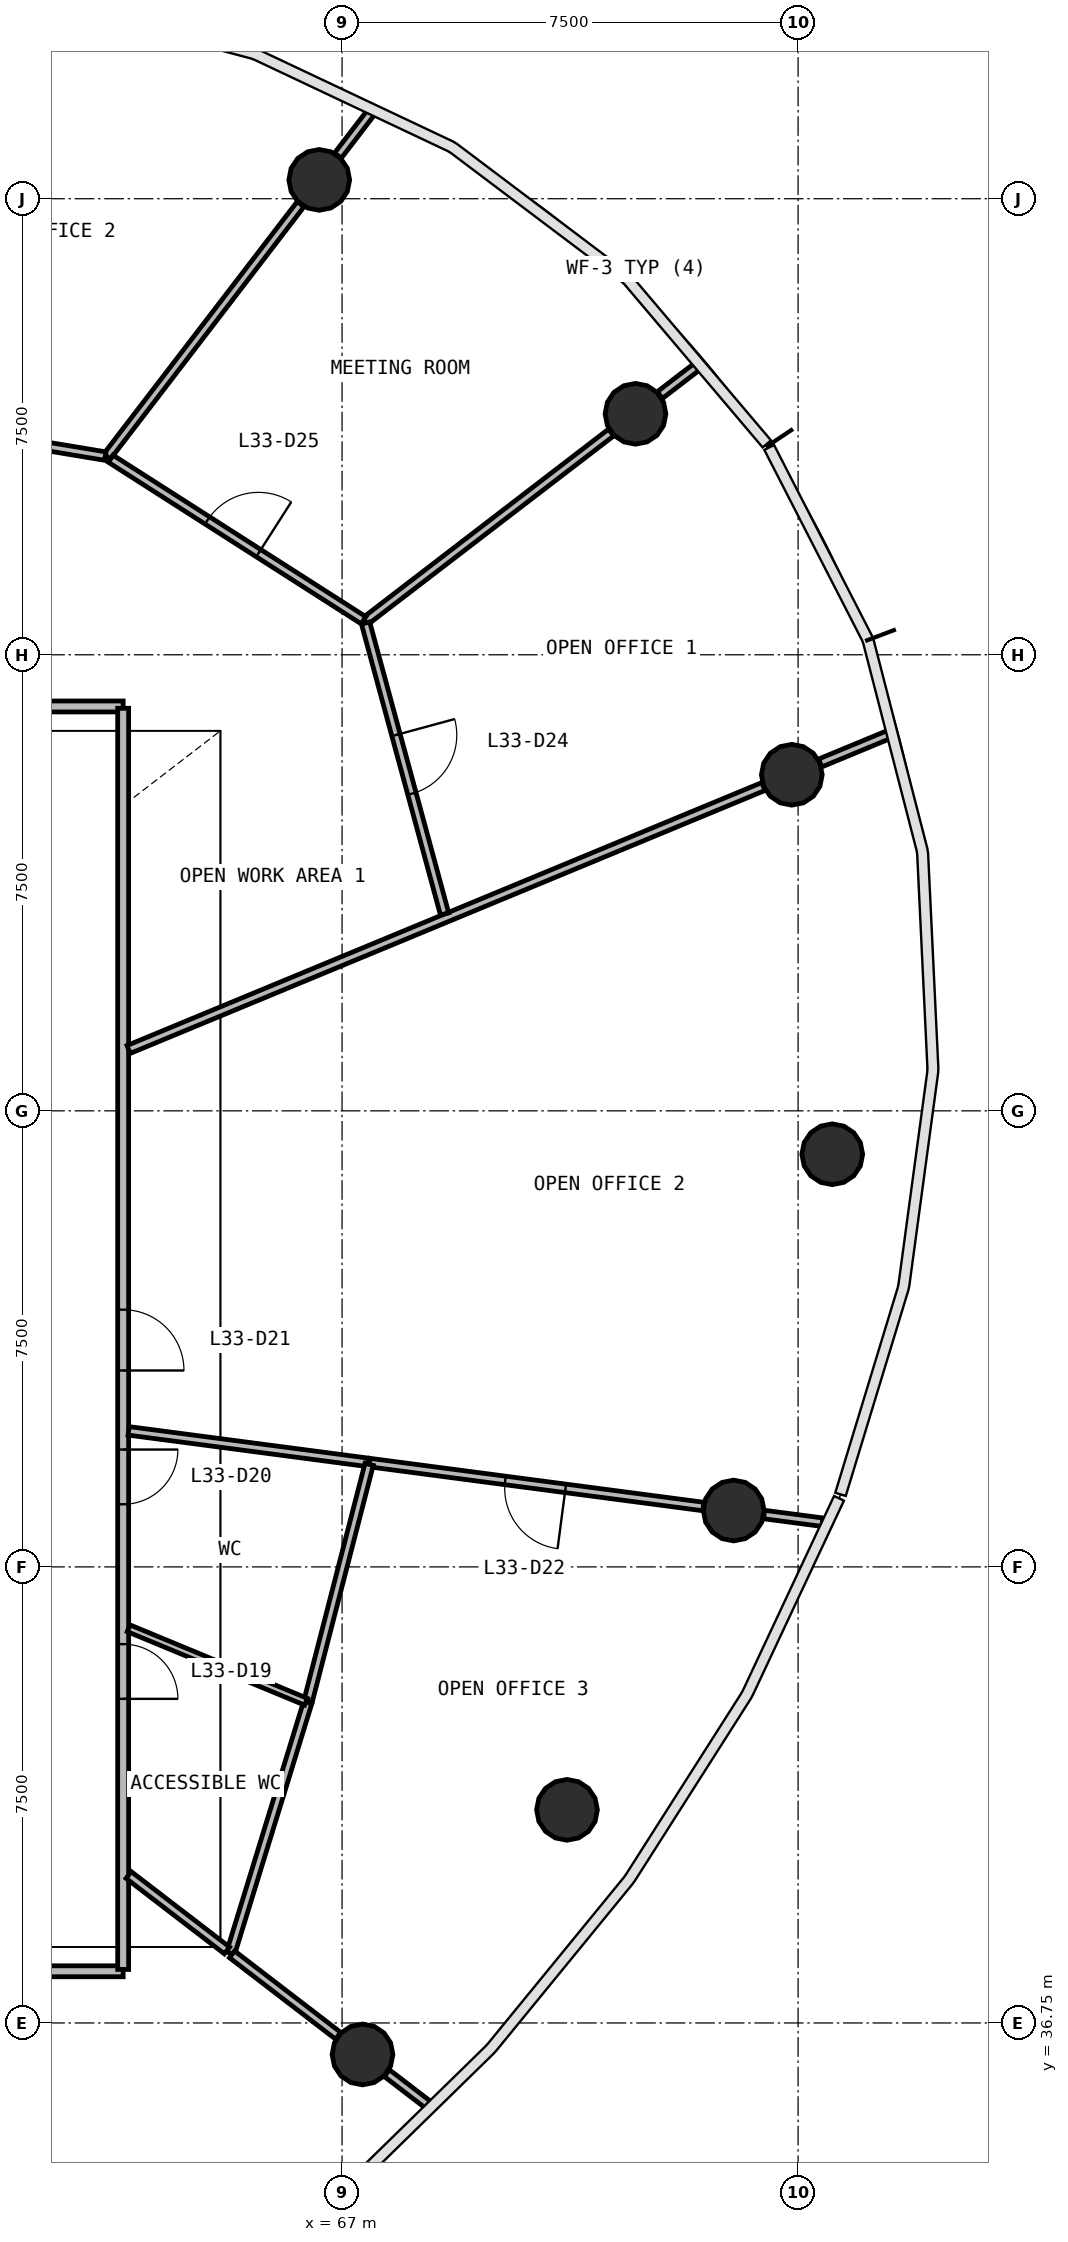
"""IFC4 building model, lengths in metres.
Left out: names, types, materials, properties, quantities, classifications, styles, units other than length and angle.
Written with IfcOpenShell. Run it as: python <this file> out.ifc"""

import sys

from ifc_helpers import new_model, si_unit, direction, frame, frame_2d, origin, origin_2d, place, context, subcontext, project, spatial, rectangle, circle, extrude, source, transform, mapped, element, fill, save


model = new_model("IFC4")
c1 = context("Model", 3, precision=1e-05, world=origin(), true_north=direction((0.0, 1.0)))
c2 = subcontext(c1, "Body", "Model", "MODEL_VIEW")
j1 = project(units=[si_unit("LENGTHUNIT", "METRE"), si_unit("PLANEANGLEUNIT", "RADIAN")], contexts=[c1])
p1 = place(None, origin())
s1 = spatial("IfcSite", under=j1, at=p1, CompositionType="ELEMENT")
p2 = place(p1, origin())
s2 = spatial("IfcBuilding", under=s1, at=p2, CompositionType="ELEMENT")
p3 = place(p2, frame((0.0, 0.0, 140.9)))
s3 = spatial("IfcBuildingStorey", under=s2, at=p3, CompositionType="ELEMENT", Elevation=140.9)
m1 = source(origin(), c2, "Body", "SweptSolid", [
    extrude(circle(Radius=0.5, at=origin_2d()), origin(), (0.0, 0.0, 1.0), 3.9),
])
for number, where, z_axis, x_axis in (
    (1, (75.062, 51.036, 0.0), (0.0, 0.0, 1.0), (1.0, 0.0, 0.0)),
    (2, (74.397, 57.277, 0.0), (0.0, 0.0, 1.0), (1.0, 0.0, 0.0)),
    (3, (71.826, 63.213, 0.0), (0.0, 0.0, 1.0), (1.0, 0.0, 0.0)),
    (4, (66.625, 67.06, 0.0), (0.0, 0.0, 1.0), (1.0, 0.0, 0.0)),
    (5, (67.336, 36.232, 0.0), (0.0, 0.0, 1.0), (1.0, 0.0, 0.0)),
    (6, (70.699, 40.254, 0.0), (0.0, 0.0, 1.0), (1.0, 0.0, 0.0)),
    (7, (73.441, 45.177, 0.0), (0.0, 0.0, 1.0), (1.0, 0.0, 0.0)),
):
    element("IfcColumn", number, at=place(p3, frame(where, z_axis=z_axis, x_axis=x_axis)), inside=s3, PredefinedType="COLUMN", context=c2, shape_type="MappedRepresentation", body=[
        mapped(m1, transform((0.0, 0.0, 0.0), scale=1.0)),
    ])
p4 = place(p3, frame((40.6, 58.4, 0.0), z_axis=(0.0, 0.0, 1.0), x_axis=(1.0, 0.0, 0.0)))
e8 = element("IfcWall", 8, at=p4, inside=s3, PredefinedType="PARTITIONING", context=c2, shape_type="SweptSolid", body=[
    extrude(rectangle(XDim=22.8, YDim=0.18, at=frame_2d((11.4, 0.0))), origin(), (0.0, 0.0, 1.0), 2.88),
])
p5 = place(p4, frame((16.15, 0.0, 0.0)))
e9 = element("IfcOpeningElement", 9, at=p5, cuts=e8, PredefinedType="OPENING", context=c2, shape_type="SweptSolid", body=[
    extrude(rectangle(XDim=1.0, YDim=2.1, at=frame_2d((0.5, 1.05))), frame((0.0, 0.1, 0.0), z_axis=(0.0, -1.0, 0.0), x_axis=(1.0, 0.0, 0.0)), (0.0, 0.0, 1.0), 0.2),
])
p6 = place(p4, frame((10.95, 0.0, 0.0)))
e10 = element("IfcOpeningElement", 10, at=p6, cuts=e8, PredefinedType="OPENING", context=c2, shape_type="SweptSolid", body=[
    extrude(rectangle(XDim=1.0, YDim=2.1, at=frame_2d((0.5, 1.05))), frame((0.0, 0.1, 0.0), z_axis=(0.0, -1.0, 0.0), x_axis=(1.0, 0.0, 0.0)), (0.0, 0.0, 1.0), 0.2),
])
p7 = place(p4, frame((8.75, 0.0, 0.0)))
e11 = element("IfcOpeningElement", 11, at=p7, cuts=e8, PredefinedType="OPENING", context=c2, shape_type="SweptSolid", body=[
    extrude(rectangle(XDim=1.0, YDim=2.1, at=frame_2d((0.5, 1.05))), frame((0.0, 0.1, 0.0), z_axis=(0.0, -1.0, 0.0), x_axis=(1.0, 0.0, 0.0)), (0.0, 0.0, 1.0), 0.2),
])
p8 = place(p3, frame((63.4, 37.6, 0.0), z_axis=(0.0, 0.0, 1.0), x_axis=(-1.0, 0.0, 0.0)))
e12 = element("IfcWall", 12, at=p8, inside=s3, PredefinedType="PARTITIONING", context=c2, shape_type="SweptSolid", body=[
    extrude(rectangle(XDim=22.8, YDim=0.18, at=frame_2d((11.4, 0.0))), origin(), (0.0, 0.0, 1.0), 2.88),
])
p9 = place(p8, frame((10.95, 0.0, 0.0)))
e13 = element("IfcOpeningElement", 13, at=p9, cuts=e12, PredefinedType="OPENING", context=c2, shape_type="SweptSolid", body=[
    extrude(rectangle(XDim=1.0, YDim=2.1, at=frame_2d((0.5, 1.05))), frame((0.0, 0.1, 0.0), z_axis=(0.0, -1.0, 0.0), x_axis=(1.0, 0.0, 0.0)), (0.0, 0.0, 1.0), 0.2),
])
p10 = place(p8, frame((8.75, 0.0, 0.0)))
e14 = element("IfcOpeningElement", 14, at=p10, cuts=e12, PredefinedType="OPENING", context=c2, shape_type="SweptSolid", body=[
    extrude(rectangle(XDim=1.0, YDim=2.1, at=frame_2d((0.5, 1.05))), frame((0.0, 0.1, 0.0), z_axis=(0.0, -1.0, 0.0), x_axis=(1.0, 0.0, 0.0)), (0.0, 0.0, 1.0), 0.2),
])
p11 = place(p3, frame((63.4, 58.37, 0.0), z_axis=(0.0, 0.0, 1.0), x_axis=(0.0, -1.0, 0.0)))
e15 = element("IfcWall", 15, at=p11, inside=s3, PredefinedType="PARTITIONING", context=c2, shape_type="SweptSolid", body=[
    extrude(rectangle(XDim=20.74, YDim=0.18, at=frame_2d((10.37, 0.0))), origin(), (0.0, 0.0, 1.0), 2.88),
])
p12 = place(p11, frame((15.39, 0.0, 0.0)))
e16 = element("IfcOpeningElement", 16, at=p12, cuts=e15, PredefinedType="OPENING", context=c2, shape_type="SweptSolid", body=[
    extrude(rectangle(XDim=0.9, YDim=2.1, at=frame_2d((0.45, 1.05))), frame((0.0, 0.1, 0.0), z_axis=(0.0, -1.0, 0.0), x_axis=(1.0, 0.0, 0.0)), (0.0, 0.0, 1.0), 0.2),
])
p13 = place(p11, frame((12.19, 0.0, 0.0)))
e17 = element("IfcOpeningElement", 17, at=p13, cuts=e15, PredefinedType="OPENING", context=c2, shape_type="SweptSolid", body=[
    extrude(rectangle(XDim=0.9, YDim=2.1, at=frame_2d((0.45, 1.05))), frame((0.0, 0.1, 0.0), z_axis=(0.0, -1.0, 0.0), x_axis=(1.0, 0.0, 0.0)), (0.0, 0.0, 1.0), 0.2),
])
p14 = place(p11, frame((9.89, 0.0, 0.0)))
e18 = element("IfcOpeningElement", 18, at=p14, cuts=e15, PredefinedType="OPENING", context=c2, shape_type="SweptSolid", body=[
    extrude(rectangle(XDim=1.0, YDim=2.1, at=frame_2d((0.5, 1.05))), frame((0.0, 0.1, 0.0), z_axis=(0.0, -1.0, 0.0), x_axis=(1.0, 0.0, 0.0)), (0.0, 0.0, 1.0), 0.2),
])
p15 = place(p3, frame((73.93, 57.084, 0.0), z_axis=(0.0, 0.0, 1.0), x_axis=(-0.923879643786, -0.382683163725, 0.0)))
e19 = element("IfcWall", 19, at=p15, inside=s3, PredefinedType="PARTITIONING", context=c2, shape_type="SweptSolid", body=[
    extrude(rectangle(XDim=11.3, YDim=0.14, at=frame_2d((5.65, 0.0))), origin(), (0.0, 0.0, 1.0), 2.88),
])
p16 = place(p3, frame((72.941, 45.243, 0.0), z_axis=(0.0, 0.0, 1.0), x_axis=(-0.991447989587, 0.130502428879, 0.0)))
e20 = element("IfcWall", 20, at=p16, inside=s3, PredefinedType="PARTITIONING", context=c2, shape_type="SweptSolid", body=[
    extrude(rectangle(XDim=5.536, YDim=0.14, at=frame_2d((2.768, 0.0))), origin(), (0.0, 0.0, 1.0), 2.88),
])
p17 = place(p16, frame((2.286, 0.0, 0.0)))
e21 = element("IfcOpeningElement", 21, at=p17, cuts=e20, PredefinedType="OPENING", context=c2, shape_type="SweptSolid", body=[
    extrude(rectangle(XDim=1.0, YDim=2.1, at=frame_2d((0.5, 1.05))), frame((0.0, 0.08, 0.0), z_axis=(0.0, -1.0, 0.0), x_axis=(1.0, 0.0, 0.0)), (0.0, 0.0, 1.0), 0.16),
])
p18 = place(p3, frame((63.136, 62.512, 0.0), z_axis=(0.0, 0.0, 1.0), x_axis=(0.608759991658, 0.793354443207, 0.0)))
e22 = element("IfcWall", 22, at=p18, inside=s3, PredefinedType="PARTITIONING", context=c2, shape_type="SweptSolid", body=[
    extrude(rectangle(XDim=5.227, YDim=0.14, at=frame_2d((2.613, 0.0))), origin(), (0.0, 0.0, 1.0), 2.88),
])
p19 = place(p3, frame((67.379, 59.801, 0.0), z_axis=(0.0, 0.0, 1.0), x_axis=(0.79338135979, 0.608724911547, 0.0)))
e23 = element("IfcWall", 23, at=p19, inside=s3, PredefinedType="PARTITIONING", context=c2, shape_type="SweptSolid", body=[
    extrude(rectangle(XDim=5.101, YDim=0.14, at=frame_2d((2.55, 0.0))), origin(), (0.0, 0.0, 1.0), 2.88),
])
p20 = place(p3, frame((67.387, 59.772, 0.0), z_axis=(0.0, 0.0, 1.0), x_axis=(0.262079708004, -0.965046230319, 0.0)))
e24 = element("IfcWall", 24, at=p20, inside=s3, PredefinedType="PARTITIONING", context=c2, shape_type="SweptSolid", body=[
    extrude(rectangle(XDim=4.958, YDim=0.14, at=frame_2d((2.479, 0.0))), origin(), (0.0, 0.0, 1.0), 2.88),
])
p21 = place(p20, frame((1.908, 0.0, 0.0)))
e25 = element("IfcOpeningElement", 25, at=p21, cuts=e24, PredefinedType="OPENING", context=c2, shape_type="SweptSolid", body=[
    extrude(rectangle(XDim=1.0, YDim=2.1, at=frame_2d((0.5, 1.05))), frame((0.0, 0.08, 0.0), z_axis=(0.0, -1.0, 0.0), x_axis=(1.0, 0.0, 0.0)), (0.0, 0.0, 1.0), 0.16),
])
p22 = place(p3, frame((63.195, 62.475, 0.0), z_axis=(0.0, 0.0, 1.0), x_axis=(0.842625182258, -0.538500512743, 0.0)))
e26 = element("IfcWall", 26, at=p22, inside=s3, PredefinedType="PARTITIONING", context=c2, shape_type="SweptSolid", body=[
    extrude(rectangle(XDim=4.935, YDim=0.14, at=frame_2d((2.468, 0.0))), origin(), (0.0, 0.0, 1.0), 2.88),
])
p23 = place(p22, frame((1.885, 0.0, 0.0)))
e27 = element("IfcOpeningElement", 27, at=p23, cuts=e26, PredefinedType="OPENING", context=c2, shape_type="SweptSolid", body=[
    extrude(rectangle(XDim=1.0, YDim=2.1, at=frame_2d((0.5, 1.05))), frame((0.0, 0.08, 0.0), z_axis=(0.0, -1.0, 0.0), x_axis=(1.0, 0.0, 0.0)), (0.0, 0.0, 1.0), 0.16),
])
p24 = place(p3, frame((58.412, 63.298, 0.0), z_axis=(0.0, 0.0, 1.0), x_axis=(0.986464551943, -0.163974655849, 0.0)))
e28 = element("IfcWall", 28, at=p24, inside=s3, PredefinedType="PARTITIONING", context=c2, shape_type="SweptSolid", body=[
    extrude(rectangle(XDim=4.759, YDim=0.14, at=frame_2d((2.379, 0.0))), origin(), (0.0, 0.0, 1.0), 2.88),
])
p25 = place(p24, frame((1.908, 0.0, 0.0)))
e29 = element("IfcOpeningElement", 29, at=p25, cuts=e28, PredefinedType="OPENING", context=c2, shape_type="SweptSolid", body=[
    extrude(rectangle(XDim=1.0, YDim=2.1, at=frame_2d((0.5, 1.05))), frame((0.0, 0.08, 0.0), z_axis=(0.0, -1.0, 0.0), x_axis=(1.0, 0.0, 0.0)), (0.0, 0.0, 1.0), 0.16),
])
p26 = place(p3, frame((65.167, 37.897, 0.0), z_axis=(0.0, 0.0, 1.0), x_axis=(0.294141518145, 0.955761877929, 0.0)))
e30 = element("IfcWall", 30, at=p26, inside=s3, PredefinedType="PARTITIONING", context=c2, shape_type="SweptSolid", body=[
    extrude(rectangle(XDim=4.314, YDim=0.14, at=frame_2d((2.157, 0.0))), origin(), (0.0, 0.0, 1.0), 2.88),
])
p27 = place(p3, frame((63.49, 46.487, 0.0), z_axis=(0.0, 0.0, 1.0), x_axis=(0.991443189387, -0.130538891594, 0.0)))
e31 = element("IfcWall", 31, at=p27, inside=s3, PredefinedType="PARTITIONING", context=c2, shape_type="SweptSolid", body=[
    extrude(rectangle(XDim=3.967, YDim=0.14, at=frame_2d((1.983, 0.0))), origin(), (0.0, 0.0, 1.0), 2.88),
])
p28 = place(p3, frame((66.443, 42.05, 0.0), z_axis=(0.0, 0.0, 1.0), x_axis=(0.249613122832, 0.968345645372, 0.0)))
e32 = element("IfcWall", 32, at=p28, inside=s3, PredefinedType="PARTITIONING", context=c2, shape_type="SweptSolid", body=[
    extrude(rectangle(XDim=4.014, YDim=0.14, at=frame_2d((2.007, 0.0))), origin(), (0.0, 0.0, 1.0), 2.88),
])
p29 = place(p3, frame((65.19, 37.879, 0.0), z_axis=(0.0, 0.0, 1.0), x_axis=(0.793320542196, -0.608804169934, 0.0)))
e33 = element("IfcWall", 33, at=p29, inside=s3, PredefinedType="PARTITIONING", context=c2, shape_type="SweptSolid", body=[
    extrude(rectangle(XDim=2.2, YDim=0.14, at=frame_2d((1.1, 0.0))), origin(), (0.0, 0.0, 1.0), 2.88),
])
p30 = place(p3, frame((63.49, 39.183, 0.0), z_axis=(0.0, 0.0, 1.0), x_axis=(0.79338464657, -0.6087206277, 0.0)))
e34 = element("IfcWall", 34, at=p30, inside=s3, PredefinedType="PARTITIONING", context=c2, shape_type="SweptSolid", body=[
    extrude(rectangle(XDim=2.039, YDim=0.14, at=frame_2d((1.019, 0.0))), origin(), (0.0, 0.0, 1.0), 2.88),
])
p31 = place(p3, frame((74.863, 57.47, 0.0), z_axis=(0.0, 0.0, 1.0), x_axis=(0.923875488976, 0.382693194178, 0.0)))
e35 = element("IfcWall", 35, at=p31, inside=s3, PredefinedType="PARTITIONING", context=c2, shape_type="SweptSolid", body=[
    extrude(rectangle(XDim=1.263, YDim=0.14, at=frame_2d((0.632, 0.0))), origin(), (0.0, 0.0, 1.0), 2.88),
])
p32 = place(p3, frame((73.941, 45.111, 0.0), z_axis=(0.0, 0.0, 1.0), x_axis=(0.991440537441, -0.130559031548, 0.0)))
e36 = element("IfcWall", 36, at=p32, inside=s3, PredefinedType="PARTITIONING", context=c2, shape_type="SweptSolid", body=[
    extrude(rectangle(XDim=0.967, YDim=0.14, at=frame_2d((0.483, 0.0))), origin(), (0.0, 0.0, 1.0), 2.88),
])
p33 = place(p3, frame((66.932, 67.46, 0.0), z_axis=(0.0, 0.0, 1.0), x_axis=(0.608853638779, 0.793282576731, 0.0)))
e37 = element("IfcWall", 37, at=p33, inside=s3, PredefinedType="PARTITIONING", context=c2, shape_type="SweptSolid", body=[
    extrude(rectangle(XDim=0.923, YDim=0.14, at=frame_2d((0.461, 0.0))), origin(), (0.0, 0.0, 1.0), 2.88),
])
p34 = place(p3, frame((67.737, 35.925, 0.0), z_axis=(0.0, 0.0, 1.0), x_axis=(0.793527999072, -0.608533741619, 0.0)))
e38 = element("IfcWall", 38, at=p34, inside=s3, PredefinedType="PARTITIONING", context=c2, shape_type="SweptSolid", body=[
    extrude(rectangle(XDim=0.853, YDim=0.14, at=frame_2d((0.426, 0.0))), origin(), (0.0, 0.0, 1.0), 2.88),
])
p35 = place(p3, frame((72.226, 63.52, 0.0), z_axis=(0.0, 0.0, 1.0), x_axis=(0.793312684763, 0.608814408661, 0.0)))
e39 = element("IfcWall", 39, at=p35, inside=s3, PredefinedType="PARTITIONING", context=c2, shape_type="SweptSolid", body=[
    extrude(rectangle(XDim=0.816, YDim=0.14, at=frame_2d((0.408, 0.0))), origin(), (0.0, 0.0, 1.0), 2.88),
])
p36 = place(p3, frame((63.49, 43.241, 0.0), z_axis=(0.0, 0.0, 1.0), x_axis=(0.923859477995, -0.382731844662, 0.0)))
e40 = element("IfcWall", 40, at=p36, inside=s3, PredefinedType="PARTITIONING", context=c2, shape_type="SweptSolid", body=[
    extrude(rectangle(XDim=3.158, YDim=0.12, at=frame_2d((1.579, 0.0))), origin(), (0.0, 0.0, 1.0), 2.88),
])
m2 = source(origin(), c2, "Body", "SweptSolid", [
    extrude(rectangle(XDim=0.9, YDim=2.1, at=frame_2d((0.45, 1.05))), frame((0.0, 0.025, 0.0), z_axis=(0.0, -1.0, 0.0), x_axis=(1.0, 0.0, 0.0)), (0.0, 0.0, 1.0), 0.05),
])
p37 = place(p12, origin())
e41 = element("IfcDoor", 41, at=p37, inside=s3, OperationType="SINGLE_SWING_RIGHT", PredefinedType="DOOR", context=c2, shape_type="MappedRepresentation", body=[
    mapped(m2, transform((0.0, 0.0, 0.0), scale=1.0)),
])
fill(e16, e41)
p38 = place(p13, origin())
e42 = element("IfcDoor", 42, at=p38, inside=s3, OperationType="SINGLE_SWING_LEFT", PredefinedType="DOOR", context=c2, shape_type="MappedRepresentation", body=[
    mapped(m2, transform((0.0, 0.0, 0.0), scale=1.0)),
])
fill(e17, e42)
m3 = source(origin(), c2, "Body", "SweptSolid", [
    extrude(rectangle(XDim=1.0, YDim=2.1, at=frame_2d((0.5, 1.05))), frame((0.0, 0.025, 0.0), z_axis=(0.0, -1.0, 0.0), x_axis=(1.0, 0.0, 0.0)), (0.0, 0.0, 1.0), 0.05),
])
p39 = place(p14, origin())
e43 = element("IfcDoor", 43, at=p39, inside=s3, OperationType="SINGLE_SWING_RIGHT", PredefinedType="DOOR", context=c2, shape_type="MappedRepresentation", body=[
    mapped(m3, transform((0.0, 0.0, 0.0), scale=1.0)),
])
fill(e18, e43)
p40 = place(p17, origin())
e44 = element("IfcDoor", 44, at=p40, inside=s3, OperationType="SINGLE_SWING_LEFT", PredefinedType="DOOR", context=c2, shape_type="MappedRepresentation", body=[
    mapped(m3, transform((0.0, 0.0, 0.0), scale=1.0)),
])
fill(e21, e44)
p41 = place(p21, origin())
e45 = element("IfcDoor", 45, at=p41, inside=s3, OperationType="SINGLE_SWING_LEFT", PredefinedType="DOOR", context=c2, shape_type="MappedRepresentation", body=[
    mapped(m3, transform((0.0, 0.0, 0.0), scale=1.0)),
])
fill(e25, e45)
p42 = place(p23, origin())
e46 = element("IfcDoor", 46, at=p42, inside=s3, OperationType="SINGLE_SWING_RIGHT", PredefinedType="DOOR", context=c2, shape_type="MappedRepresentation", body=[
    mapped(m3, transform((0.0, 0.0, 0.0), scale=1.0)),
])
fill(e27, e46)
save(model, sys.argv[1])
